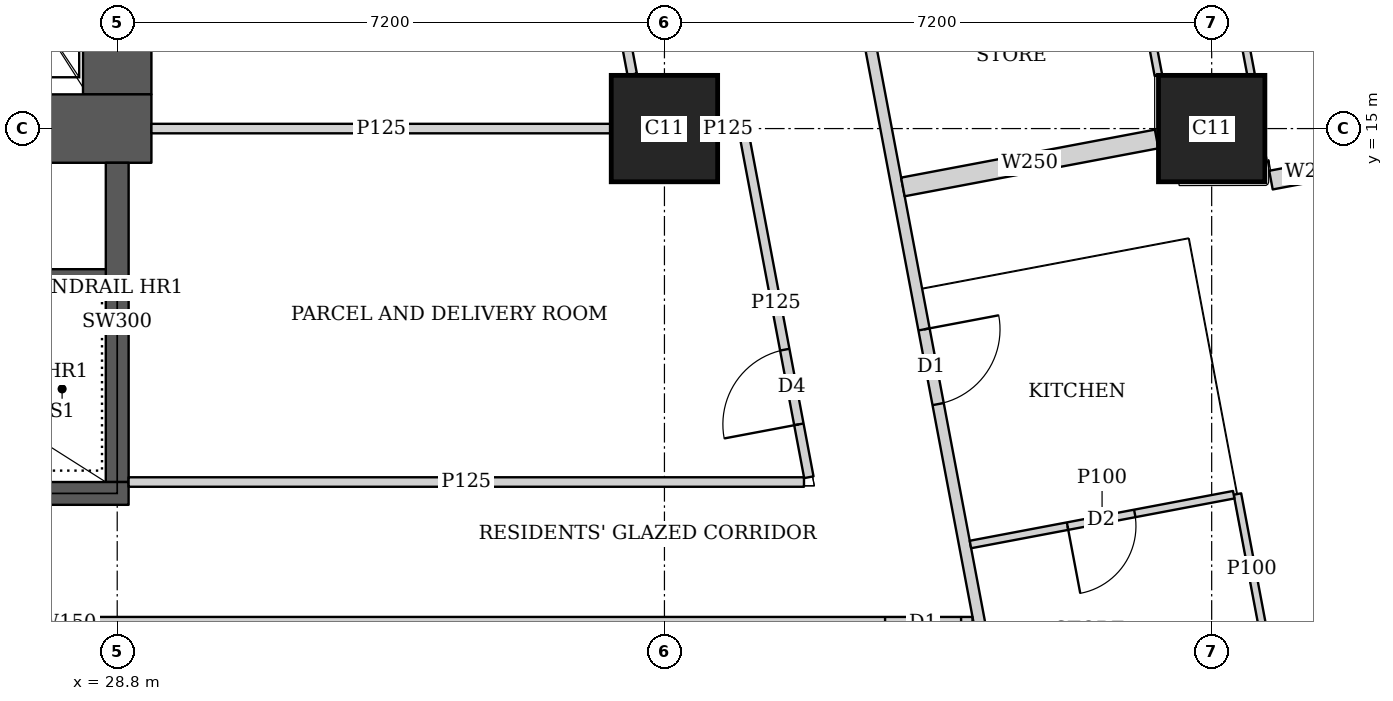
"""IFC4 building model, lengths in metres.
Left out: names, types, materials, properties, quantities, classifications, styles, units other than length and angle.
Written with IfcOpenShell. Run it as: python <this file> out.ifc"""

import sys

from ifc_helpers import new_model, si_unit, direction, frame, frame_2d, origin, origin_2d, place, context, subcontext, project, spatial, rectangle, extrude, element, fill, save


model = new_model("IFC4")
c1 = context("Model", 3, precision=1e-05, world=origin(), true_north=direction((0.0, 1.0)))
c2 = subcontext(c1, "Body", "Model", "MODEL_VIEW")
j1 = project(units=[si_unit("LENGTHUNIT", "METRE"), si_unit("PLANEANGLEUNIT", "RADIAN")], contexts=[c1])
p1 = place(None, origin())
s1 = spatial("IfcSite", under=j1, at=p1, CompositionType="ELEMENT")
p2 = place(p1, origin())
s2 = spatial("IfcBuilding", under=s1, at=p2, CompositionType="ELEMENT")
p3 = place(p2, frame((0.0, 0.0, 227.45)))
s3 = spatial("IfcBuildingStorey", under=s2, at=p3, CompositionType="ELEMENT", Elevation=227.45)
for number, where, z_axis, x_axis in (
    (1, (36.0, 15.0, 0.0), (0.0, 0.0, 1.0), (1.0, 0.0, 0.0)),
    (2, (43.2, 15.0, 0.0), (0.0, 0.0, 1.0), (1.0, 0.0, 0.0)),
):
    element("IfcColumn", number, at=place(p3, frame(where, z_axis=z_axis, x_axis=x_axis)), inside=s3, PredefinedType="COLUMN", context=c2, shape_type="SweptSolid", body=[
        extrude(rectangle(XDim=1.4, YDim=1.4, at=origin_2d()), origin(), (0.0, 0.0, 1.0), 3.75),
    ])
p4 = place(p3, frame((13.95, 15.0, 0.0), z_axis=(0.0, 0.0, 1.0), x_axis=(1.0, 0.0, 0.0)))
e3 = element("IfcWall", 3, at=p4, inside=s3, PredefinedType="SHEAR", context=c2, shape_type="SweptSolid", body=[
    extrude(rectangle(XDim=15.3, YDim=0.9, at=frame_2d((7.65, 0.0))), origin(), (0.0, 0.0, 1.0), 3.75),
])
p5 = place(p4, frame((4.45, 0.0, 0.0)))
e4 = element("IfcOpeningElement", 4, at=p5, cuts=e3, PredefinedType="OPENING", context=c2, shape_type="SweptSolid", body=[
    extrude(rectangle(XDim=1.8, YDim=2.1, at=frame_2d((0.9, 1.05))), frame((0.0, 0.46, 0.0), z_axis=(0.0, -1.0, 0.0), x_axis=(1.0, 0.0, 0.0)), (0.0, 0.0, 1.0), 0.92),
])
p6 = place(p4, frame((10.7, 0.0, 0.0)))
e5 = element("IfcOpeningElement", 5, at=p6, cuts=e3, PredefinedType="OPENING", context=c2, shape_type="SweptSolid", body=[
    extrude(rectangle(XDim=1.1, YDim=2.1, at=frame_2d((0.55, 1.05))), frame((0.0, 0.46, 0.0), z_axis=(0.0, -1.0, 0.0), x_axis=(1.0, 0.0, 0.0)), (0.0, 0.0, 1.0), 0.92),
])
p7 = place(p3, frame((28.8, 15.45, 0.0), z_axis=(0.0, 0.0, 1.0), x_axis=(0.0, 1.0, 0.0)))
e6 = element("IfcWall", 6, at=p7, inside=s3, PredefinedType="SHEAR", context=c2, shape_type="SweptSolid", body=[
    extrude(rectangle(XDim=14.1, YDim=0.9, at=frame_2d((7.05, 0.0))), origin(), (0.0, 0.0, 1.0), 3.75),
])
p8 = place(p3, frame((21.45, 10.2, 0.0), z_axis=(0.0, 0.0, 1.0), x_axis=(1.0, 0.0, 0.0)))
e7 = element("IfcWall", 7, at=p8, inside=s3, PredefinedType="SHEAR", context=c2, shape_type="SweptSolid", body=[
    extrude(rectangle(XDim=7.5, YDim=0.3, at=frame_2d((3.75, 0.0))), origin(), (0.0, 0.0, 1.0), 3.75),
])
p9 = place(p8, frame((0.5, 0.0, 0.0)))
e8 = element("IfcOpeningElement", 8, at=p9, cuts=e7, PredefinedType="OPENING", context=c2, shape_type="SweptSolid", body=[
    extrude(rectangle(XDim=1.1, YDim=2.1, at=frame_2d((0.55, 1.05))), frame((0.0, 0.16, 0.0), z_axis=(0.0, -1.0, 0.0), x_axis=(1.0, 0.0, 0.0)), (0.0, 0.0, 1.0), 0.32),
])
p10 = place(p3, frame((28.8, 10.35, 0.0), z_axis=(0.0, 0.0, 1.0), x_axis=(0.0, 1.0, 0.0)))
e9 = element("IfcWall", 9, at=p10, inside=s3, PredefinedType="SHEAR", context=c2, shape_type="SweptSolid", body=[
    extrude(rectangle(XDim=4.2, YDim=0.3, at=frame_2d((2.1, 0.0))), origin(), (0.0, 0.0, 1.0), 3.75),
])
p11 = place(p3, frame((50.653, 2.703, 0.0), z_axis=(0.0, 0.0, 1.0), x_axis=(-0.185612026696, 0.982623109613, 0.0)))
e10 = element("IfcWall", 10, at=p11, inside=s3, PredefinedType="SOLIDWALL", context=c2, shape_type="SweptSolid", body=[
    extrude(rectangle(XDim=41.393, YDim=0.2, at=frame_2d((20.697, 0.0))), origin(), (0.0, 0.0, 1.0), 3.5),
])
p12 = place(p11, frame((1.633, 0.0, 0.9)))
e11 = element("IfcOpeningElement", 11, at=p12, cuts=e10, PredefinedType="OPENING", context=c2, shape_type="SweptSolid", body=[
    extrude(rectangle(XDim=1.8, YDim=1.5, at=frame_2d((0.9, 0.75))), frame((0.0, 0.11, 0.0), z_axis=(0.0, -1.0, 0.0), x_axis=(1.0, 0.0, 0.0)), (0.0, 0.0, 1.0), 0.22),
])
p13 = place(p11, frame((6.032, 0.0, 0.9)))
e12 = element("IfcOpeningElement", 12, at=p13, cuts=e10, PredefinedType="OPENING", context=c2, shape_type="SweptSolid", body=[
    extrude(rectangle(XDim=1.8, YDim=1.5, at=frame_2d((0.9, 0.75))), frame((0.0, 0.11, 0.0), z_axis=(0.0, -1.0, 0.0), x_axis=(1.0, 0.0, 0.0)), (0.0, 0.0, 1.0), 0.22),
])
p14 = place(p11, frame((9.848, 0.0, 0.9)))
e13 = element("IfcOpeningElement", 13, at=p14, cuts=e10, PredefinedType="OPENING", context=c2, shape_type="SweptSolid", body=[
    extrude(rectangle(XDim=1.8, YDim=1.5, at=frame_2d((0.9, 0.75))), frame((0.0, 0.11, 0.0), z_axis=(0.0, -1.0, 0.0), x_axis=(1.0, 0.0, 0.0)), (0.0, 0.0, 1.0), 0.22),
])
p15 = place(p11, frame((13.664, 0.0, 0.9)))
e14 = element("IfcOpeningElement", 14, at=p15, cuts=e10, PredefinedType="OPENING", context=c2, shape_type="SweptSolid", body=[
    extrude(rectangle(XDim=1.8, YDim=1.5, at=frame_2d((0.9, 0.75))), frame((0.0, 0.11, 0.0), z_axis=(0.0, -1.0, 0.0), x_axis=(1.0, 0.0, 0.0)), (0.0, 0.0, 1.0), 0.22),
])
p16 = place(p11, frame((17.481, 0.0, 0.9)))
e15 = element("IfcOpeningElement", 15, at=p16, cuts=e10, PredefinedType="OPENING", context=c2, shape_type="SweptSolid", body=[
    extrude(rectangle(XDim=1.8, YDim=1.5, at=frame_2d((0.9, 0.75))), frame((0.0, 0.11, 0.0), z_axis=(0.0, -1.0, 0.0), x_axis=(1.0, 0.0, 0.0)), (0.0, 0.0, 1.0), 0.22),
])
p17 = place(p11, frame((21.297, 0.0, 0.9)))
e16 = element("IfcOpeningElement", 16, at=p17, cuts=e10, PredefinedType="OPENING", context=c2, shape_type="SweptSolid", body=[
    extrude(rectangle(XDim=1.8, YDim=1.5, at=frame_2d((0.9, 0.75))), frame((0.0, 0.11, 0.0), z_axis=(0.0, -1.0, 0.0), x_axis=(1.0, 0.0, 0.0)), (0.0, 0.0, 1.0), 0.22),
])
p18 = place(p11, frame((25.113, 0.0, 0.9)))
e17 = element("IfcOpeningElement", 17, at=p18, cuts=e10, PredefinedType="OPENING", context=c2, shape_type="SweptSolid", body=[
    extrude(rectangle(XDim=1.8, YDim=1.5, at=frame_2d((0.9, 0.75))), frame((0.0, 0.11, 0.0), z_axis=(0.0, -1.0, 0.0), x_axis=(1.0, 0.0, 0.0)), (0.0, 0.0, 1.0), 0.22),
])
p19 = place(p11, frame((28.93, 0.0, 0.9)))
e18 = element("IfcOpeningElement", 18, at=p19, cuts=e10, PredefinedType="OPENING", context=c2, shape_type="SweptSolid", body=[
    extrude(rectangle(XDim=1.8, YDim=1.5, at=frame_2d((0.9, 0.75))), frame((0.0, 0.11, 0.0), z_axis=(0.0, -1.0, 0.0), x_axis=(1.0, 0.0, 0.0)), (0.0, 0.0, 1.0), 0.22),
])
p20 = place(p11, frame((32.746, 0.0, 0.9)))
e19 = element("IfcOpeningElement", 19, at=p20, cuts=e10, PredefinedType="OPENING", context=c2, shape_type="SweptSolid", body=[
    extrude(rectangle(XDim=1.8, YDim=1.5, at=frame_2d((0.9, 0.75))), frame((0.0, 0.11, 0.0), z_axis=(0.0, -1.0, 0.0), x_axis=(1.0, 0.0, 0.0)), (0.0, 0.0, 1.0), 0.22),
])
p21 = place(p11, frame((36.481, 0.0, 0.9)))
e20 = element("IfcOpeningElement", 20, at=p21, cuts=e10, PredefinedType="OPENING", context=c2, shape_type="SweptSolid", body=[
    extrude(rectangle(XDim=1.8, YDim=1.5, at=frame_2d((0.9, 0.75))), frame((0.0, 0.11, 0.0), z_axis=(0.0, -1.0, 0.0), x_axis=(1.0, 0.0, 0.0)), (0.0, 0.0, 1.0), 0.22),
])
p22 = place(p3, frame((40.053, 8.5, 0.0), z_axis=(0.0, 0.0, 1.0), x_axis=(-1.0, 0.0, 0.0)))
e21 = element("IfcWall", 21, at=p22, inside=s3, PredefinedType="SOLIDWALL", context=c2, shape_type="SweptSolid", body=[
    extrude(rectangle(XDim=23.798, YDim=0.15, at=frame_2d((11.899, 0.0))), origin(), (0.0, 0.0, 1.0), 3.5),
])
p23 = place(p22, frame((21.978, 0.0, 0.0)))
e22 = element("IfcOpeningElement", 22, at=p23, cuts=e21, PredefinedType="OPENING", context=c2, shape_type="SweptSolid", body=[
    extrude(rectangle(XDim=1.0, YDim=2.1, at=frame_2d((0.5, 1.05))), frame((0.0, 0.085, 0.0), z_axis=(0.0, -1.0, 0.0), x_axis=(1.0, 0.0, 0.0)), (0.0, 0.0, 1.0), 0.17),
])
p24 = place(p22, frame((12.753, 0.0, 0.0)))
e23 = element("IfcOpeningElement", 23, at=p24, cuts=e21, PredefinedType="OPENING", context=c2, shape_type="SweptSolid", body=[
    extrude(rectangle(XDim=1.0, YDim=2.1, at=frame_2d((0.5, 1.05))), frame((0.0, 0.085, 0.0), z_axis=(0.0, -1.0, 0.0), x_axis=(1.0, 0.0, 0.0)), (0.0, 0.0, 1.0), 0.17),
])
p25 = place(p22, frame((0.15, 0.0, 0.0)))
e24 = element("IfcOpeningElement", 24, at=p25, cuts=e21, PredefinedType="OPENING", context=c2, shape_type="SweptSolid", body=[
    extrude(rectangle(XDim=1.0, YDim=2.1, at=frame_2d((0.5, 1.05))), frame((0.0, 0.085, 0.0), z_axis=(0.0, -1.0, 0.0), x_axis=(1.0, 0.0, 0.0)), (0.0, 0.0, 1.0), 0.17),
])
p26 = place(p3, frame((33.68, 42.723, 0.0), z_axis=(0.0, 0.0, 1.0), x_axis=(0.185601160014, -0.982625162207, 0.0)))
e25 = element("IfcWall", 25, at=p26, inside=s3, PredefinedType="SOLIDWALL", context=c2, shape_type="SweptSolid", body=[
    extrude(rectangle(XDim=41.051, YDim=0.15, at=frame_2d((20.526, 0.0))), origin(), (0.0, 0.0, 1.0), 2.5),
])
p27 = place(p26, frame((16.123, 0.0, 0.0)))
e26 = element("IfcOpeningElement", 26, at=p27, cuts=e25, PredefinedType="OPENING", context=c2, shape_type="SweptSolid", body=[
    extrude(rectangle(XDim=1.0, YDim=2.1, at=frame_2d((0.5, 1.05))), frame((0.0, 0.085, 0.0), z_axis=(0.0, -1.0, 0.0), x_axis=(1.0, 0.0, 0.0)), (0.0, 0.0, 1.0), 0.17),
])
p28 = place(p26, frame((19.938, 0.0, 0.0)))
e27 = element("IfcOpeningElement", 27, at=p28, cuts=e25, PredefinedType="OPENING", context=c2, shape_type="SweptSolid", body=[
    extrude(rectangle(XDim=1.0, YDim=2.1, at=frame_2d((0.5, 1.05))), frame((0.0, 0.085, 0.0), z_axis=(0.0, -1.0, 0.0), x_axis=(1.0, 0.0, 0.0)), (0.0, 0.0, 1.0), 0.17),
])
p29 = place(p26, frame((30.902, 0.0, 0.0)))
e28 = element("IfcOpeningElement", 28, at=p29, cuts=e25, PredefinedType="OPENING", context=c2, shape_type="SweptSolid", body=[
    extrude(rectangle(XDim=1.0, YDim=2.1, at=frame_2d((0.5, 1.05))), frame((0.0, 0.085, 0.0), z_axis=(0.0, -1.0, 0.0), x_axis=(1.0, 0.0, 0.0)), (0.0, 0.0, 1.0), 0.17),
])
p30 = place(p3, frame((42.566, 21.809, 0.0), z_axis=(0.0, 0.0, 1.0), x_axis=(0.185613526435, -0.98262282632, 0.0)))
e29 = element("IfcWall", 29, at=p30, inside=s3, PredefinedType="PARTITIONING", context=c2, shape_type="SweptSolid", body=[
    extrude(rectangle(XDim=6.207, YDim=0.1, at=frame_2d((3.104, 0.0))), origin(), (0.0, 0.0, 1.0), 2.5),
])
p31 = place(p30, frame((1.45, 0.0, 0.0)))
e30 = element("IfcOpeningElement", 30, at=p31, cuts=e29, PredefinedType="OPENING", context=c2, shape_type="SweptSolid", body=[
    extrude(rectangle(XDim=0.9, YDim=2.1, at=frame_2d((0.45, 1.05))), frame((0.0, 0.06, 0.0), z_axis=(0.0, -1.0, 0.0), x_axis=(1.0, 0.0, 0.0)), (0.0, 0.0, 1.0), 0.12),
])
p32 = place(p30, frame((4.163, 0.0, 0.0)))
e31 = element("IfcOpeningElement", 31, at=p32, cuts=e29, PredefinedType="OPENING", context=c2, shape_type="SweptSolid", body=[
    extrude(rectangle(XDim=0.9, YDim=2.1, at=frame_2d((0.45, 1.05))), frame((0.0, 0.06, 0.0), z_axis=(0.0, -1.0, 0.0), x_axis=(1.0, 0.0, 0.0)), (0.0, 0.0, 1.0), 0.12),
])
p33 = place(p3, frame((41.414, 21.442, 0.0), z_axis=(0.0, 0.0, 1.0), x_axis=(0.185698675093, -0.982606738257, 0.0)))
e32 = element("IfcWall", 32, at=p33, inside=s3, PredefinedType="PARTITIONING", context=c2, shape_type="SweptSolid", body=[
    extrude(rectangle(XDim=5.843, YDim=0.1, at=frame_2d((2.921, 0.0))), origin(), (0.0, 0.0, 1.0), 3.5),
])
p34 = place(p33, frame((0.575, 0.0, 0.0)))
e33 = element("IfcOpeningElement", 33, at=p34, cuts=e32, PredefinedType="OPENING", context=c2, shape_type="SweptSolid", body=[
    extrude(rectangle(XDim=0.9, YDim=2.1, at=frame_2d((0.45, 1.05))), frame((0.0, 0.06, 0.0), z_axis=(0.0, -1.0, 0.0), x_axis=(1.0, 0.0, 0.0)), (0.0, 0.0, 1.0), 0.12),
])
p35 = place(p33, frame((2.483, 0.0, 0.0)))
e34 = element("IfcOpeningElement", 34, at=p35, cuts=e32, PredefinedType="OPENING", context=c2, shape_type="SweptSolid", body=[
    extrude(rectangle(XDim=0.9, YDim=2.1, at=frame_2d((0.45, 1.05))), frame((0.0, 0.06, 0.0), z_axis=(0.0, -1.0, 0.0), x_axis=(1.0, 0.0, 0.0)), (0.0, 0.0, 1.0), 0.12),
])
p36 = place(p3, frame((43.539, 10.192, 0.0), z_axis=(0.0, 0.0, 1.0), x_axis=(0.185443145218, -0.982654995353, 0.0)))
e35 = element("IfcWall", 35, at=p36, inside=s3, PredefinedType="PARTITIONING", context=c2, shape_type="SweptSolid", body=[
    extrude(rectangle(XDim=2.017, YDim=0.1, at=frame_2d((1.008, 0.0))), origin(), (0.0, 0.0, 1.0), 3.5),
])
p37 = place(p3, frame((43.49, 10.183, 0.0), z_axis=(0.0, 0.0, 1.0), x_axis=(-0.982588017646, -0.185797706064, 0.0)))
e36 = element("IfcWall", 36, at=p37, inside=s3, PredefinedType="PARTITIONING", context=c2, shape_type="SweptSolid", body=[
    extrude(rectangle(XDim=3.525, YDim=0.1, at=frame_2d((1.763, 0.0))), origin(), (0.0, 0.0, 1.0), 3.5),
])
p38 = place(p37, frame((1.325, 0.0, 0.0)))
e37 = element("IfcOpeningElement", 37, at=p38, cuts=e36, PredefinedType="OPENING", context=c2, shape_type="SweptSolid", body=[
    extrude(rectangle(XDim=0.9, YDim=2.1, at=frame_2d((0.45, 1.05))), frame((0.0, 0.06, 0.0), z_axis=(0.0, -1.0, 0.0), x_axis=(1.0, 0.0, 0.0)), (0.0, 0.0, 1.0), 0.12),
])
p39 = place(p3, frame((45.09, 14.531, 0.0), z_axis=(0.0, 0.0, 1.0), x_axis=(-0.982737354171, -0.185006196431, 0.0)))
e38 = element("IfcWall", 38, at=p39, inside=s3, PredefinedType="SOLIDWALL", context=c2, shape_type="SweptSolid", body=[
    extrude(rectangle(XDim=1.13, YDim=0.25, at=frame_2d((0.565, 0.0))), origin(), (0.0, 0.0, 1.0), 2.05),
])
p40 = place(p3, frame((42.476, 14.863, 0.0), z_axis=(0.0, 0.0, 1.0), x_axis=(-0.982603567712, -0.185715450942, 0.0)))
e39 = element("IfcWall", 39, at=p40, inside=s3, PredefinedType="SOLIDWALL", context=c2, shape_type="SweptSolid", body=[
    extrude(rectangle(XDim=3.398, YDim=0.25, at=frame_2d((1.699, 0.0))), origin(), (0.0, 0.0, 1.0), 3.5),
])
p41 = place(p3, frame((28.95, 10.35, 0.0), z_axis=(0.0, 0.0, 1.0), x_axis=(1.0, 0.0, 0.0)))
e40 = element("IfcWall", 40, at=p41, inside=s3, PredefinedType="PARTITIONING", context=c2, shape_type="SweptSolid", body=[
    extrude(rectangle(XDim=8.886, YDim=0.125, at=frame_2d((4.443, 0.0))), origin(), (0.0, 0.0, 1.0), 3.5),
])
p42 = place(p3, frame((37.9, 10.413, 0.0), z_axis=(0.0, 0.0, 1.0), x_axis=(-0.185513629891, 0.982641691119, 0.0)))
e41 = element("IfcWall", 41, at=p42, inside=s3, PredefinedType="PARTITIONING", context=c2, shape_type="SweptSolid", body=[
    extrude(rectangle(XDim=4.668, YDim=0.125, at=frame_2d((2.334, 0.0))), origin(), (0.0, 0.0, 1.0), 3.5),
])
p43 = place(p42, frame((0.708, 0.0, 0.0)))
e42 = element("IfcOpeningElement", 42, at=p43, cuts=e41, PredefinedType="OPENING", context=c2, shape_type="SweptSolid", body=[
    extrude(rectangle(XDim=1.0, YDim=2.1, at=frame_2d((0.5, 1.05))), frame((0.0, 0.073, 0.0), z_axis=(0.0, -1.0, 0.0), x_axis=(1.0, 0.0, 0.0)), (0.0, 0.0, 1.0), 0.145),
])
p44 = place(p3, frame((35.576, 15.713, 0.0), z_axis=(0.0, 0.0, 1.0), x_axis=(-0.185602982696, 0.982624817931, 0.0)))
e43 = element("IfcWall", 43, at=p44, inside=s3, PredefinedType="PARTITIONING", context=c2, shape_type="SweptSolid", body=[
    extrude(rectangle(XDim=13.814, YDim=0.125, at=frame_2d((6.907, 0.0))), origin(), (0.0, 0.0, 1.0), 2.5),
])
p45 = place(p44, frame((5.3, 0.0, 0.0)))
e44 = element("IfcOpeningElement", 44, at=p45, cuts=e43, PredefinedType="OPENING", context=c2, shape_type="SweptSolid", body=[
    extrude(rectangle(XDim=1.0, YDim=2.1, at=frame_2d((0.5, 1.05))), frame((0.0, 0.073, 0.0), z_axis=(0.0, -1.0, 0.0), x_axis=(1.0, 0.0, 0.0)), (0.0, 0.0, 1.0), 0.145),
])
p46 = place(p3, frame((29.25, 15.0, 0.0), z_axis=(0.0, 0.0, 1.0), x_axis=(1.0, 0.0, 0.0)))
e45 = element("IfcWall", 45, at=p46, inside=s3, PredefinedType="PARTITIONING", context=c2, shape_type="SweptSolid", body=[
    extrude(rectangle(XDim=6.049, YDim=0.125, at=frame_2d((3.024, 0.0))), origin(), (0.0, 0.0, 1.0), 3.5),
])
p47 = place(p3, frame((36.701, 15.0, 0.0), z_axis=(0.0, 0.0, 1.0), x_axis=(1.0, 0.0, 0.0)))
e46 = element("IfcWall", 46, at=p47, inside=s3, PredefinedType="PARTITIONING", context=c2, shape_type="SweptSolid", body=[
    extrude(rectangle(XDim=0.272, YDim=0.125, at=frame_2d((0.136, 0.0))), origin(), (0.0, 0.0, 1.0), 3.5),
])
p48 = place(p3, frame((23.0, 13.05, 0.0), z_axis=(0.0, 0.0, 1.0), x_axis=(1.0, 0.0, 0.0)))
e47 = element("IfcWall", 47, at=p48, inside=s3, PredefinedType="SHEAR", context=c2, shape_type="SweptSolid", body=[
    extrude(rectangle(XDim=5.8, YDim=0.2, at=frame_2d((2.9, 0.0))), origin(), (0.0, 0.0, 1.0), 3.75),
])
p49 = place(p25, origin())
e48 = element("IfcDoor", 48, at=p49, inside=s3, OperationType="SINGLE_SWING_LEFT", PredefinedType="DOOR", context=c2, shape_type="SweptSolid", body=[
    extrude(rectangle(XDim=1.0, YDim=2.1, at=frame_2d((0.5, 1.05))), frame((0.0, 0.025, 0.0), z_axis=(0.0, -1.0, 0.0), x_axis=(1.0, 0.0, 0.0)), (0.0, 0.0, 1.0), 0.05),
])
fill(e24, e48)
p50 = place(p29, origin())
e49 = element("IfcDoor", 49, at=p50, inside=s3, OperationType="SINGLE_SWING_LEFT", PredefinedType="DOOR", context=c2, shape_type="SweptSolid", body=[
    extrude(rectangle(XDim=1.0, YDim=2.1, at=frame_2d((0.5, 1.05))), frame((0.0, 0.025, 0.0), z_axis=(0.0, -1.0, 0.0), x_axis=(1.0, 0.0, 0.0)), (0.0, 0.0, 1.0), 0.05),
])
fill(e28, e49)
p51 = place(p38, origin())
e50 = element("IfcDoor", 50, at=p51, inside=s3, OperationType="SINGLE_SWING_RIGHT", PredefinedType="DOOR", context=c2, shape_type="SweptSolid", body=[
    extrude(rectangle(XDim=0.9, YDim=2.1, at=frame_2d((0.45, 1.05))), frame((0.0, 0.025, 0.0), z_axis=(0.0, -1.0, 0.0), x_axis=(1.0, 0.0, 0.0)), (0.0, 0.0, 1.0), 0.05),
])
fill(e37, e50)
p52 = place(p43, origin())
e51 = element("IfcDoor", 51, at=p52, inside=s3, OperationType="SINGLE_SWING_LEFT", PredefinedType="DOOR", context=c2, shape_type="SweptSolid", body=[
    extrude(rectangle(XDim=1.0, YDim=2.1, at=frame_2d((0.5, 1.05))), frame((0.0, 0.025, 0.0), z_axis=(0.0, -1.0, 0.0), x_axis=(1.0, 0.0, 0.0)), (0.0, 0.0, 1.0), 0.05),
])
fill(e42, e51)
save(model, sys.argv[1])
